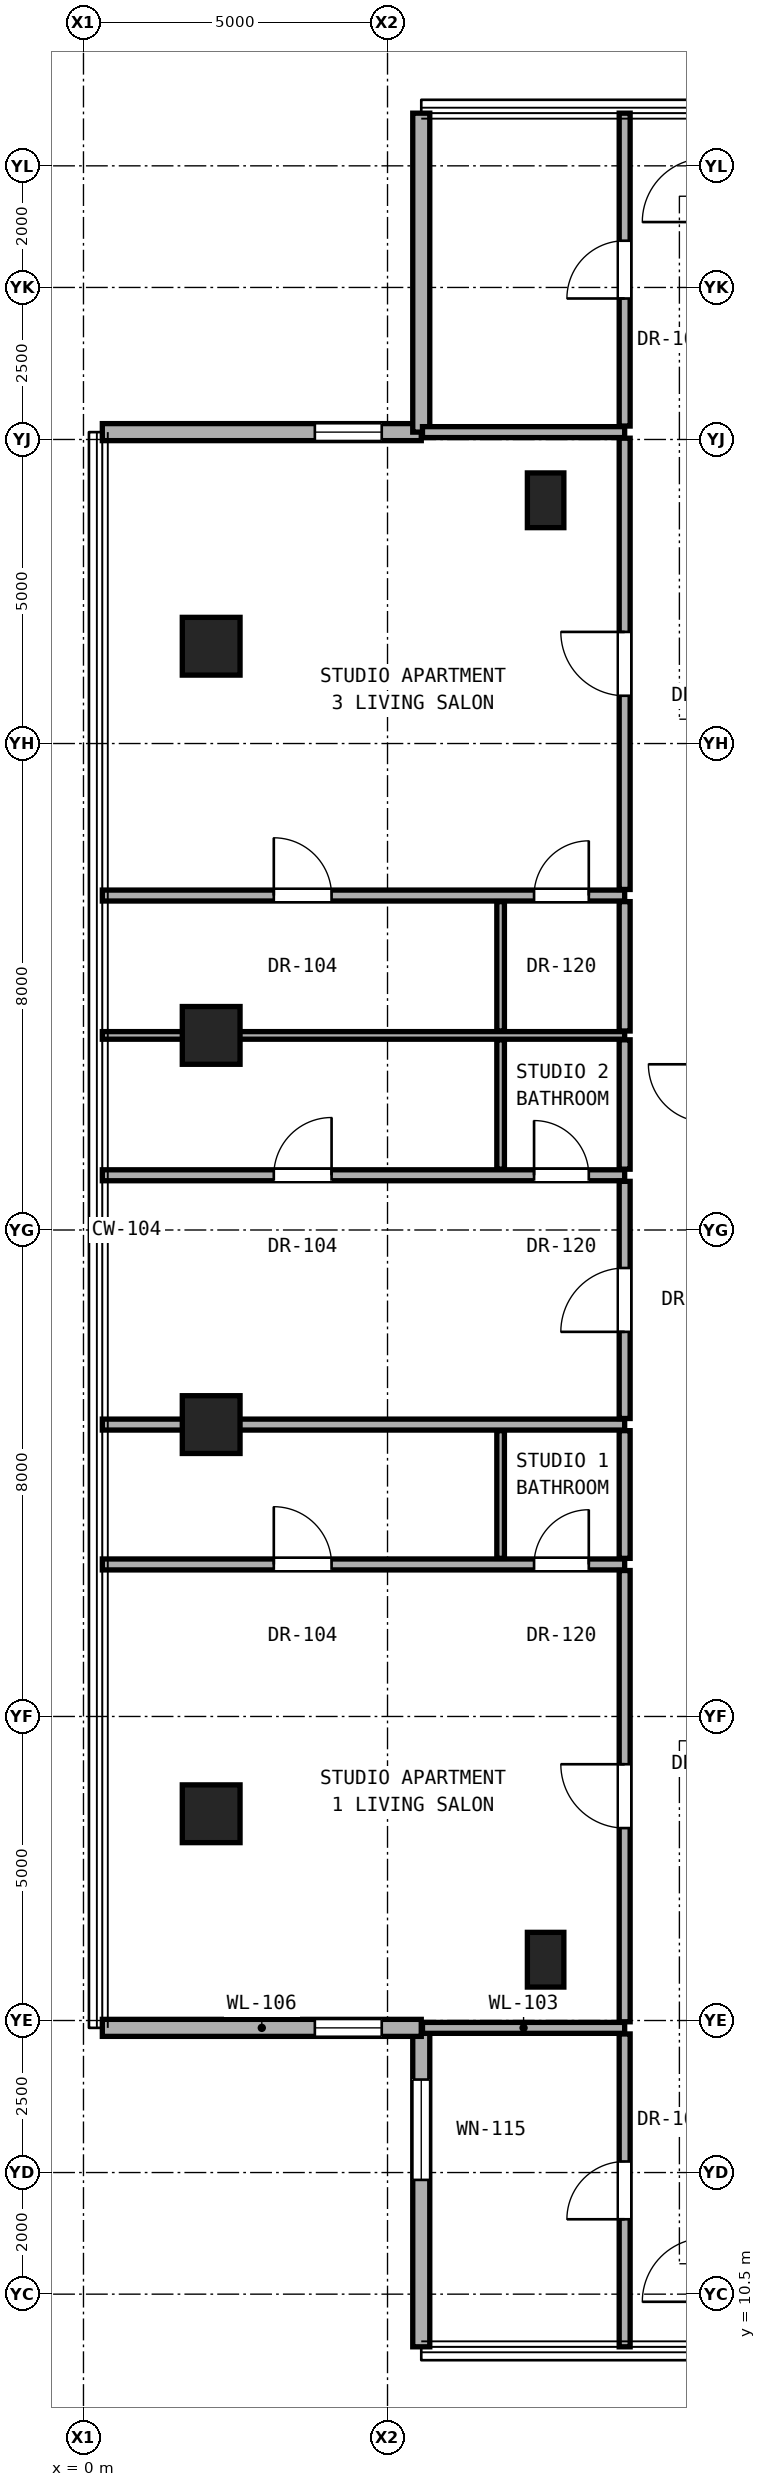
"""IFC4 building model, lengths in metres.
Left out: names, types, materials, properties, quantities, classifications, styles, units other than length and angle.
Written with IfcOpenShell. Run it as: python <this file> out.ifc"""

import sys

from ifc_helpers import new_model, si_unit, direction, frame, frame_2d, origin, origin_2d, place, context, subcontext, project, spatial, rectangle, hollow_rectangle, extrude, element, fill, save


model = new_model("IFC4")
c1 = context("Model", 3, precision=1e-05, world=origin(), true_north=direction((0.0, 1.0)))
c2 = subcontext(c1, "Body", "Model", "MODEL_VIEW")
j1 = project(units=[si_unit("LENGTHUNIT", "METRE"), si_unit("PLANEANGLEUNIT", "RADIAN")], contexts=[c1])
p1 = place(None, origin())
s1 = spatial("IfcSite", under=j1, at=p1, CompositionType="ELEMENT")
p2 = place(p1, origin())
s2 = spatial("IfcBuilding", under=s1, at=p2, CompositionType="ELEMENT")
p3 = place(p2, frame((0.0, 0.0, 160.9)))
s3 = spatial("IfcBuildingStorey", under=s2, at=p3, CompositionType="ELEMENT", Elevation=160.9)
for number, where, z_axis, x_axis in (
    (1, (2.1, 18.4, 0.0), (0.0, 0.0, 1.0), (1.0, 0.0, 0.0)),
    (2, (2.1, 24.8, 0.0), (0.0, 0.0, 1.0), (1.0, 0.0, 0.0)),
    (3, (2.1, 31.2, 0.0), (0.0, 0.0, 1.0), (1.0, 0.0, 0.0)),
    (4, (2.1, 37.6, 0.0), (0.0, 0.0, 1.0), (1.0, 0.0, 0.0)),
):
    element("IfcColumn", number, at=place(p3, frame(where, z_axis=z_axis, x_axis=x_axis)), inside=s3, PredefinedType="COLUMN", context=c2, shape_type="SweptSolid", body=[
        extrude(hollow_rectangle(XDim=0.95, YDim=0.95, WallThickness=0.05, at=origin_2d()), origin(), (0.0, 0.0, 1.0), 3.25),
    ])
for number, where, z_axis, x_axis in (
    (5, (7.6, 16.0, 0.0), (0.0, 0.0, 1.0), (1.0, 0.0, 0.0)),
    (6, (7.6, 40.0, 0.0), (0.0, 0.0, 1.0), (1.0, 0.0, 0.0)),
):
    element("IfcColumn", number, at=place(p3, frame(where, z_axis=z_axis, x_axis=x_axis)), inside=s3, PredefinedType="PILASTER", context=c2, shape_type="SweptSolid", body=[
        extrude(rectangle(XDim=0.6, YDim=0.9, at=origin_2d()), origin(), (0.0, 0.0, 1.0), 3.25),
    ])
p4 = place(p3, frame((5.555, 14.879, 0.0), z_axis=(0.0, 0.0, 1.0), x_axis=(0.0, -1.0, 0.0)))
e7 = element("IfcWall", 7, at=p4, inside=s3, PredefinedType="SOLIDWALL", context=c2, shape_type="SweptSolid", body=[
    extrude(rectangle(XDim=5.245, YDim=0.28, at=frame_2d((2.623, 0.0))), origin(), (0.0, 0.0, 1.0), 3.03),
])
p5 = place(p4, frame((0.85, 0.0, 0.68)))
e8 = element("IfcOpeningElement", 8, at=p5, cuts=e7, PredefinedType="OPENING", context=c2, shape_type="SweptSolid", body=[
    extrude(rectangle(XDim=1.65, YDim=2.2, at=frame_2d((0.825, 1.1))), frame((0.0, 0.15, 0.0), z_axis=(0.0, -1.0, 0.0), x_axis=(1.0, 0.0, 0.0)), (0.0, 0.0, 1.0), 0.3),
])
p6 = place(p3, frame((0.31, 14.879, 0.0), z_axis=(0.0, 0.0, 1.0), x_axis=(1.0, 0.0, 0.0)))
e9 = element("IfcWall", 9, at=p6, inside=s3, PredefinedType="SOLIDWALL", context=c2, shape_type="SweptSolid", body=[
    extrude(rectangle(XDim=5.245, YDim=0.28, at=frame_2d((2.623, 0.0))), origin(), (0.0, 0.0, 1.0), 3.03),
])
p7 = place(p6, frame((3.495, 0.0, 0.85)))
e10 = element("IfcOpeningElement", 10, at=p7, cuts=e9, PredefinedType="OPENING", context=c2, shape_type="SweptSolid", body=[
    extrude(rectangle(XDim=1.1, YDim=2.0, at=frame_2d((0.55, 1.0))), frame((0.0, 0.15, 0.0), z_axis=(0.0, -1.0, 0.0), x_axis=(1.0, 0.0, 0.0)), (0.0, 0.0, 1.0), 0.3),
])
p8 = place(p3, frame((5.555, 41.121, 0.0), z_axis=(0.0, 0.0, 1.0), x_axis=(-1.0, 0.0, 0.0)))
e11 = element("IfcWall", 11, at=p8, inside=s3, PredefinedType="SOLIDWALL", context=c2, shape_type="SweptSolid", body=[
    extrude(rectangle(XDim=5.245, YDim=0.28, at=frame_2d((2.623, 0.0))), origin(), (0.0, 0.0, 1.0), 3.03),
])
p9 = place(p8, frame((0.65, 0.0, 0.85)))
e12 = element("IfcOpeningElement", 12, at=p9, cuts=e11, PredefinedType="OPENING", context=c2, shape_type="SweptSolid", body=[
    extrude(rectangle(XDim=1.1, YDim=2.0, at=frame_2d((0.55, 1.0))), frame((0.0, 0.15, 0.0), z_axis=(0.0, -1.0, 0.0), x_axis=(1.0, 0.0, 0.0)), (0.0, 0.0, 1.0), 0.3),
])
p10 = place(p3, frame((5.555, 46.366, 0.0), z_axis=(0.0, 0.0, 1.0), x_axis=(0.0, -1.0, 0.0)))
e13 = element("IfcWall", 13, at=p10, inside=s3, PredefinedType="SOLIDWALL", context=c2, shape_type="SweptSolid", body=[
    extrude(rectangle(XDim=5.245, YDim=0.28, at=frame_2d((2.623, 0.0))), origin(), (0.0, 0.0, 1.0), 3.03),
])
p11 = place(p3, frame((5.575, 14.879, 0.0), z_axis=(0.0, 0.0, 1.0), x_axis=(1.0, 0.0, 0.0)))
e14 = element("IfcWall", 14, at=p11, inside=s3, PredefinedType="PARTITIONING", context=c2, shape_type="SweptSolid", body=[
    extrude(rectangle(XDim=3.325, YDim=0.18, at=frame_2d((1.663, 0.0))), origin(), (0.0, 0.0, 1.0), 3.05),
])
p12 = place(p3, frame((0.31, 22.5, 0.0), z_axis=(0.0, 0.0, 1.0), x_axis=(1.0, 0.0, 0.0)))
e15 = element("IfcWall", 15, at=p12, inside=s3, PredefinedType="PARTITIONING", context=c2, shape_type="SweptSolid", body=[
    extrude(rectangle(XDim=8.59, YDim=0.18, at=frame_2d((4.295, 0.0))), origin(), (0.0, 0.0, 1.0), 2.269),
])
p13 = place(p12, frame((2.82, 0.0, 0.0)))
e16 = element("IfcOpeningElement", 16, at=p13, cuts=e15, PredefinedType="OPENING", context=c2, shape_type="SweptSolid", body=[
    extrude(rectangle(XDim=0.95, YDim=2.15, at=frame_2d((0.475, 1.075))), frame((0.0, 0.1, 0.0), z_axis=(0.0, -1.0, 0.0), x_axis=(1.0, 0.0, 0.0)), (0.0, 0.0, 1.0), 0.2),
])
p14 = place(p12, frame((7.1, 0.0, 0.0)))
e17 = element("IfcOpeningElement", 17, at=p14, cuts=e15, PredefinedType="OPENING", context=c2, shape_type="SweptSolid", body=[
    extrude(rectangle(XDim=0.9, YDim=2.1, at=frame_2d((0.45, 1.05))), frame((0.0, 0.1, 0.0), z_axis=(0.0, -1.0, 0.0), x_axis=(1.0, 0.0, 0.0)), (0.0, 0.0, 1.0), 0.2),
])
p15 = place(p3, frame((0.31, 24.8, 0.0), z_axis=(0.0, 0.0, 1.0), x_axis=(1.0, 0.0, 0.0)))
e18 = element("IfcWall", 18, at=p15, inside=s3, PredefinedType="PARTITIONING", context=c2, shape_type="SweptSolid", body=[
    extrude(rectangle(XDim=8.59, YDim=0.18, at=frame_2d((4.295, 0.0))), origin(), (0.0, 0.0, 1.0), 2.269),
])
p16 = place(p3, frame((0.31, 28.9, 0.0), z_axis=(0.0, 0.0, 1.0), x_axis=(1.0, 0.0, 0.0)))
e19 = element("IfcWall", 19, at=p16, inside=s3, PredefinedType="PARTITIONING", context=c2, shape_type="SweptSolid", body=[
    extrude(rectangle(XDim=8.59, YDim=0.18, at=frame_2d((4.295, 0.0))), origin(), (0.0, 0.0, 1.0), 2.269),
])
p17 = place(p16, frame((2.82, 0.0, 0.0)))
e20 = element("IfcOpeningElement", 20, at=p17, cuts=e19, PredefinedType="OPENING", context=c2, shape_type="SweptSolid", body=[
    extrude(rectangle(XDim=0.95, YDim=2.15, at=frame_2d((0.475, 1.075))), frame((0.0, 0.1, 0.0), z_axis=(0.0, -1.0, 0.0), x_axis=(1.0, 0.0, 0.0)), (0.0, 0.0, 1.0), 0.2),
])
p18 = place(p16, frame((7.1, 0.0, 0.0)))
e21 = element("IfcOpeningElement", 21, at=p18, cuts=e19, PredefinedType="OPENING", context=c2, shape_type="SweptSolid", body=[
    extrude(rectangle(XDim=0.9, YDim=2.1, at=frame_2d((0.45, 1.05))), frame((0.0, 0.1, 0.0), z_axis=(0.0, -1.0, 0.0), x_axis=(1.0, 0.0, 0.0)), (0.0, 0.0, 1.0), 0.2),
])
p19 = place(p3, frame((0.31, 31.2, 0.0), z_axis=(0.0, 0.0, 1.0), x_axis=(1.0, 0.0, 0.0)))
e22 = element("IfcWall", 22, at=p19, inside=s3, PredefinedType="PARTITIONING", context=c2, shape_type="SweptSolid", body=[
    extrude(rectangle(XDim=8.59, YDim=0.125, at=frame_2d((4.295, 0.0))), origin(), (0.0, 0.0, 1.0), 2.269),
])
p20 = place(p3, frame((0.31, 33.5, 0.0), z_axis=(0.0, 0.0, 1.0), x_axis=(1.0, 0.0, 0.0)))
e23 = element("IfcWall", 23, at=p20, inside=s3, PredefinedType="PARTITIONING", context=c2, shape_type="SweptSolid", body=[
    extrude(rectangle(XDim=8.59, YDim=0.18, at=frame_2d((4.295, 0.0))), origin(), (0.0, 0.0, 1.0), 2.269),
])
p21 = place(p20, frame((2.82, 0.0, 0.0)))
e24 = element("IfcOpeningElement", 24, at=p21, cuts=e23, PredefinedType="OPENING", context=c2, shape_type="SweptSolid", body=[
    extrude(rectangle(XDim=0.95, YDim=2.15, at=frame_2d((0.475, 1.075))), frame((0.0, 0.1, 0.0), z_axis=(0.0, -1.0, 0.0), x_axis=(1.0, 0.0, 0.0)), (0.0, 0.0, 1.0), 0.2),
])
p22 = place(p20, frame((7.1, 0.0, 0.0)))
e25 = element("IfcOpeningElement", 25, at=p22, cuts=e23, PredefinedType="OPENING", context=c2, shape_type="SweptSolid", body=[
    extrude(rectangle(XDim=0.9, YDim=2.1, at=frame_2d((0.45, 1.05))), frame((0.0, 0.1, 0.0), z_axis=(0.0, -1.0, 0.0), x_axis=(1.0, 0.0, 0.0)), (0.0, 0.0, 1.0), 0.2),
])
p23 = place(p3, frame((5.575, 41.121, 0.0), z_axis=(0.0, 0.0, 1.0), x_axis=(1.0, 0.0, 0.0)))
e26 = element("IfcWall", 26, at=p23, inside=s3, PredefinedType="PARTITIONING", context=c2, shape_type="SweptSolid", body=[
    extrude(rectangle(XDim=3.325, YDim=0.18, at=frame_2d((1.663, 0.0))), origin(), (0.0, 0.0, 1.0), 3.05),
])
p24 = place(p3, frame((6.86, 22.6, 0.0), z_axis=(0.0, 0.0, 1.0), x_axis=(0.0, 1.0, 0.0)))
e27 = element("IfcWall", 27, at=p24, inside=s3, PredefinedType="PARTITIONING", context=c2, shape_type="SweptSolid", body=[
    extrude(rectangle(XDim=2.1, YDim=0.125, at=frame_2d((1.05, 0.0))), origin(), (0.0, 0.0, 1.0), 2.346),
])
for number, where, z_axis, x_axis in (
    (28, (6.86, 29.0, 0.0), (0.0, 0.0, 1.0), (0.0, 1.0, 0.0)),
    (29, (6.86, 31.272, 0.0), (0.0, 0.0, 1.0), (0.0, 1.0, 0.0)),
):
    element("IfcWall", number, at=place(p3, frame(where, z_axis=z_axis, x_axis=x_axis)), inside=s3, PredefinedType="PARTITIONING", context=c2, shape_type="SweptSolid", body=[
        extrude(rectangle(XDim=2.127, YDim=0.125, at=frame_2d((1.064, 0.0))), origin(), (0.0, 0.0, 1.0), 2.346),
    ])
p25 = place(p3, frame((8.9, 9.634, 0.0), z_axis=(0.0, 0.0, 1.0), x_axis=(0.0, 1.0, 0.0)))
e30 = element("IfcWall", 30, at=p25, inside=s3, PredefinedType="PARTITIONING", context=c2, shape_type="SweptSolid", body=[
    extrude(rectangle(XDim=5.145, YDim=0.18, at=frame_2d((2.573, 0.0))), origin(), (0.0, 0.0, 1.0), 3.05),
])
p26 = place(p25, frame((2.097, 0.0, 0.0)))
e31 = element("IfcOpeningElement", 31, at=p26, cuts=e30, PredefinedType="OPENING", context=c2, shape_type="SweptSolid", body=[
    extrude(rectangle(XDim=0.95, YDim=2.15, at=frame_2d((0.475, 1.075))), frame((0.0, 0.1, 0.0), z_axis=(0.0, -1.0, 0.0), x_axis=(1.0, 0.0, 0.0)), (0.0, 0.0, 1.0), 0.2),
])
p27 = place(p3, frame((8.9, 14.979, 0.0), z_axis=(0.0, 0.0, 1.0), x_axis=(0.0, 1.0, 0.0)))
e32 = element("IfcWall", 32, at=p27, inside=s3, PredefinedType="PARTITIONING", context=c2, shape_type="SweptSolid", body=[
    extrude(rectangle(XDim=7.421, YDim=0.18, at=frame_2d((3.71, 0.0))), origin(), (0.0, 0.0, 1.0), 2.442),
])
p28 = place(p27, frame((3.186, 0.0, 0.0)))
e33 = element("IfcOpeningElement", 33, at=p28, cuts=e32, PredefinedType="OPENING", context=c2, shape_type="SweptSolid", body=[
    extrude(rectangle(XDim=1.05, YDim=2.2, at=frame_2d((0.525, 1.1))), frame((0.0, 0.1, 0.0), z_axis=(0.0, -1.0, 0.0), x_axis=(1.0, 0.0, 0.0)), (0.0, 0.0, 1.0), 0.2),
])
p29 = place(p3, frame((8.9, 22.6, 0.0), z_axis=(0.0, 0.0, 1.0), x_axis=(0.0, 1.0, 0.0)))
e34 = element("IfcWall", 34, at=p29, inside=s3, PredefinedType="PARTITIONING", context=c2, shape_type="SweptSolid", body=[
    extrude(rectangle(XDim=2.1, YDim=0.18, at=frame_2d((1.05, 0.0))), origin(), (0.0, 0.0, 1.0), 2.346),
])
p30 = place(p3, frame((8.9, 24.9, 0.0), z_axis=(0.0, 0.0, 1.0), x_axis=(0.0, 1.0, 0.0)))
e35 = element("IfcWall", 35, at=p30, inside=s3, PredefinedType="PARTITIONING", context=c2, shape_type="SweptSolid", body=[
    extrude(rectangle(XDim=3.9, YDim=0.18, at=frame_2d((1.95, 0.0))), origin(), (0.0, 0.0, 1.0), 2.346),
])
p31 = place(p30, frame((1.425, 0.0, 0.0)))
e36 = element("IfcOpeningElement", 36, at=p31, cuts=e35, PredefinedType="OPENING", context=c2, shape_type="SweptSolid", body=[
    extrude(rectangle(XDim=1.05, YDim=2.2, at=frame_2d((0.525, 1.1))), frame((0.0, 0.1, 0.0), z_axis=(0.0, -1.0, 0.0), x_axis=(1.0, 0.0, 0.0)), (0.0, 0.0, 1.0), 0.2),
])
for number, where, z_axis, x_axis in (
    (37, (8.9, 29.0, 0.0), (0.0, 0.0, 1.0), (0.0, 1.0, 0.0)),
    (38, (8.9, 31.272, 0.0), (0.0, 0.0, 1.0), (0.0, 1.0, 0.0)),
):
    element("IfcWall", number, at=place(p3, frame(where, z_axis=z_axis, x_axis=x_axis)), inside=s3, PredefinedType="PARTITIONING", context=c2, shape_type="SweptSolid", body=[
        extrude(rectangle(XDim=2.127, YDim=0.18, at=frame_2d((1.064, 0.0))), origin(), (0.0, 0.0, 1.0), 2.346),
    ])
p32 = place(p3, frame((8.9, 33.6, 0.0), z_axis=(0.0, 0.0, 1.0), x_axis=(0.0, 1.0, 0.0)))
e39 = element("IfcWall", 39, at=p32, inside=s3, PredefinedType="PARTITIONING", context=c2, shape_type="SweptSolid", body=[
    extrude(rectangle(XDim=7.421, YDim=0.18, at=frame_2d((3.71, 0.0))), origin(), (0.0, 0.0, 1.0), 2.442),
])
p33 = place(p32, frame((3.186, 0.0, 0.0)))
e40 = element("IfcOpeningElement", 40, at=p33, cuts=e39, PredefinedType="OPENING", context=c2, shape_type="SweptSolid", body=[
    extrude(rectangle(XDim=1.05, YDim=2.2, at=frame_2d((0.525, 1.1))), frame((0.0, 0.1, 0.0), z_axis=(0.0, -1.0, 0.0), x_axis=(1.0, 0.0, 0.0)), (0.0, 0.0, 1.0), 0.2),
])
p34 = place(p3, frame((8.9, 41.221, 0.0), z_axis=(0.0, 0.0, 1.0), x_axis=(0.0, 1.0, 0.0)))
e41 = element("IfcWall", 41, at=p34, inside=s3, PredefinedType="PARTITIONING", context=c2, shape_type="SweptSolid", body=[
    extrude(rectangle(XDim=5.145, YDim=0.18, at=frame_2d((2.573, 0.0))), origin(), (0.0, 0.0, 1.0), 3.05),
])
p35 = place(p34, frame((2.097, 0.0, 0.0)))
e42 = element("IfcOpeningElement", 42, at=p35, cuts=e41, PredefinedType="OPENING", context=c2, shape_type="SweptSolid", body=[
    extrude(rectangle(XDim=0.95, YDim=2.15, at=frame_2d((0.475, 1.075))), frame((0.0, 0.1, 0.0), z_axis=(0.0, -1.0, 0.0), x_axis=(1.0, 0.0, 0.0)), (0.0, 0.0, 1.0), 0.2),
])
p36 = place(p5, origin())
e43 = element("IfcWindow", 43, at=p36, inside=s3, PartitioningType="SINGLE_PANEL", PredefinedType="WINDOW", context=c2, shape_type="SweptSolid", body=[
    extrude(rectangle(XDim=1.65, YDim=2.2, at=frame_2d((0.825, 1.1))), frame((0.0, 0.03, 0.0), z_axis=(0.0, -1.0, 0.0), x_axis=(1.0, 0.0, 0.0)), (0.0, 0.0, 1.0), 0.06),
])
fill(e8, e43)
p37 = place(p7, origin())
e44 = element("IfcWindow", 44, at=p37, inside=s3, PartitioningType="SINGLE_PANEL", PredefinedType="WINDOW", context=c2, shape_type="SweptSolid", body=[
    extrude(rectangle(XDim=1.1, YDim=2.0, at=frame_2d((0.55, 1.0))), frame((0.0, 0.03, 0.0), z_axis=(0.0, -1.0, 0.0), x_axis=(1.0, 0.0, 0.0)), (0.0, 0.0, 1.0), 0.06),
])
fill(e10, e44)
p38 = place(p9, origin())
e45 = element("IfcWindow", 45, at=p38, inside=s3, PartitioningType="SINGLE_PANEL", PredefinedType="WINDOW", context=c2, shape_type="SweptSolid", body=[
    extrude(rectangle(XDim=1.1, YDim=2.0, at=frame_2d((0.55, 1.0))), frame((0.0, 0.03, 0.0), z_axis=(0.0, -1.0, 0.0), x_axis=(1.0, 0.0, 0.0)), (0.0, 0.0, 1.0), 0.06),
])
fill(e12, e45)
p39 = place(p28, origin())
e46 = element("IfcDoor", 46, at=p39, inside=s3, OperationType="SINGLE_SWING_RIGHT", PredefinedType="DOOR", context=c2, shape_type="SweptSolid", body=[
    extrude(rectangle(XDim=1.05, YDim=2.2, at=frame_2d((0.525, 1.1))), frame((0.0, 0.025, 0.0), z_axis=(0.0, -1.0, 0.0), x_axis=(1.0, 0.0, 0.0)), (0.0, 0.0, 1.0), 0.05),
])
fill(e33, e46)
p40 = place(p13, origin())
e47 = element("IfcDoor", 47, at=p40, inside=s3, OperationType="SINGLE_SWING_LEFT", PredefinedType="DOOR", context=c2, shape_type="SweptSolid", body=[
    extrude(rectangle(XDim=0.95, YDim=2.15, at=frame_2d((0.475, 1.075))), frame((0.0, 0.025, 0.0), z_axis=(0.0, -1.0, 0.0), x_axis=(1.0, 0.0, 0.0)), (0.0, 0.0, 1.0), 0.05),
])
fill(e16, e47)
p41 = place(p14, origin())
e48 = element("IfcDoor", 48, at=p41, inside=s3, OperationType="SINGLE_SWING_RIGHT", PredefinedType="DOOR", context=c2, shape_type="SweptSolid", body=[
    extrude(rectangle(XDim=0.9, YDim=2.1, at=frame_2d((0.45, 1.05))), frame((0.0, 0.025, 0.0), z_axis=(0.0, -1.0, 0.0), x_axis=(1.0, 0.0, 0.0)), (0.0, 0.0, 1.0), 0.05),
])
fill(e17, e48)
p42 = place(p31, origin())
e49 = element("IfcDoor", 49, at=p42, inside=s3, OperationType="SINGLE_SWING_LEFT", PredefinedType="DOOR", context=c2, shape_type="SweptSolid", body=[
    extrude(rectangle(XDim=1.05, YDim=2.2, at=frame_2d((0.525, 1.1))), frame((0.0, 0.025, 0.0), z_axis=(0.0, -1.0, 0.0), x_axis=(1.0, 0.0, 0.0)), (0.0, 0.0, 1.0), 0.05),
])
fill(e36, e49)
p43 = place(p17, origin())
e50 = element("IfcDoor", 50, at=p43, inside=s3, OperationType="SINGLE_SWING_RIGHT", PredefinedType="DOOR", context=c2, shape_type="SweptSolid", body=[
    extrude(rectangle(XDim=0.95, YDim=2.15, at=frame_2d((0.475, 1.075))), frame((0.0, 0.025, 0.0), z_axis=(0.0, -1.0, 0.0), x_axis=(1.0, 0.0, 0.0)), (0.0, 0.0, 1.0), 0.05),
])
fill(e20, e50)
p44 = place(p18, origin())
e51 = element("IfcDoor", 51, at=p44, inside=s3, OperationType="SINGLE_SWING_LEFT", PredefinedType="DOOR", context=c2, shape_type="SweptSolid", body=[
    extrude(rectangle(XDim=0.9, YDim=2.1, at=frame_2d((0.45, 1.05))), frame((0.0, 0.025, 0.0), z_axis=(0.0, -1.0, 0.0), x_axis=(1.0, 0.0, 0.0)), (0.0, 0.0, 1.0), 0.05),
])
fill(e21, e51)
p45 = place(p33, origin())
e52 = element("IfcDoor", 52, at=p45, inside=s3, OperationType="SINGLE_SWING_RIGHT", PredefinedType="DOOR", context=c2, shape_type="SweptSolid", body=[
    extrude(rectangle(XDim=1.05, YDim=2.2, at=frame_2d((0.525, 1.1))), frame((0.0, 0.025, 0.0), z_axis=(0.0, -1.0, 0.0), x_axis=(1.0, 0.0, 0.0)), (0.0, 0.0, 1.0), 0.05),
])
fill(e40, e52)
p46 = place(p21, origin())
e53 = element("IfcDoor", 53, at=p46, inside=s3, OperationType="SINGLE_SWING_LEFT", PredefinedType="DOOR", context=c2, shape_type="SweptSolid", body=[
    extrude(rectangle(XDim=0.95, YDim=2.15, at=frame_2d((0.475, 1.075))), frame((0.0, 0.025, 0.0), z_axis=(0.0, -1.0, 0.0), x_axis=(1.0, 0.0, 0.0)), (0.0, 0.0, 1.0), 0.05),
])
fill(e24, e53)
p47 = place(p22, origin())
e54 = element("IfcDoor", 54, at=p47, inside=s3, OperationType="SINGLE_SWING_RIGHT", PredefinedType="DOOR", context=c2, shape_type="SweptSolid", body=[
    extrude(rectangle(XDim=0.9, YDim=2.1, at=frame_2d((0.45, 1.05))), frame((0.0, 0.025, 0.0), z_axis=(0.0, -1.0, 0.0), x_axis=(1.0, 0.0, 0.0)), (0.0, 0.0, 1.0), 0.05),
])
fill(e25, e54)
p48 = place(p26, origin())
e55 = element("IfcDoor", 55, at=p48, inside=s3, OperationType="SINGLE_SWING_LEFT", PredefinedType="DOOR", context=c2, shape_type="SweptSolid", body=[
    extrude(rectangle(XDim=0.95, YDim=2.15, at=frame_2d((0.475, 1.075))), frame((0.0, 0.025, 0.0), z_axis=(0.0, -1.0, 0.0), x_axis=(1.0, 0.0, 0.0)), (0.0, 0.0, 1.0), 0.05),
])
fill(e31, e55)
p49 = place(p35, origin())
e56 = element("IfcDoor", 56, at=p49, inside=s3, OperationType="SINGLE_SWING_LEFT", PredefinedType="DOOR", context=c2, shape_type="SweptSolid", body=[
    extrude(rectangle(XDim=0.95, YDim=2.15, at=frame_2d((0.475, 1.075))), frame((0.0, 0.025, 0.0), z_axis=(0.0, -1.0, 0.0), x_axis=(1.0, 0.0, 0.0)), (0.0, 0.0, 1.0), 0.05),
])
fill(e42, e56)
save(model, sys.argv[1])
